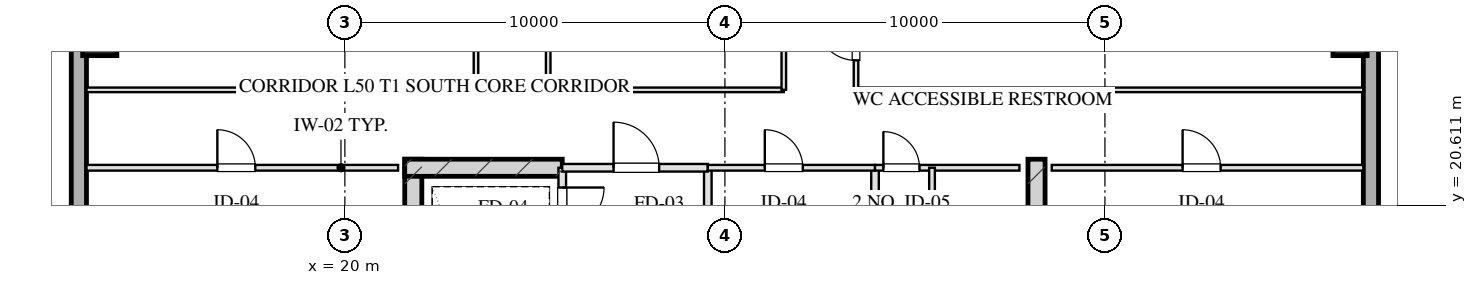
"""IFC4 building model, lengths in metres.
Left out: names, types, materials, properties, quantities, classifications, styles, units other than length and angle.
Written with IfcOpenShell. Run it as: python <this file> out.ifc"""

import sys

from ifc_helpers import new_model, si_unit, direction, frame, frame_2d, origin, origin_2d, place, context, subcontext, project, spatial, rectangle, hollow_rectangle, extrude, element, fill, save


model = new_model("IFC4")
c1 = context("Model", 3, precision=1e-05, world=origin(), true_north=direction((0.0, 1.0)))
c2 = subcontext(c1, "Body", "Model", "MODEL_VIEW")
j1 = project(units=[si_unit("LENGTHUNIT", "METRE"), si_unit("PLANEANGLEUNIT", "RADIAN")], contexts=[c1])
p1 = place(None, origin())
s1 = spatial("IfcSite", under=j1, at=p1, CompositionType="ELEMENT")
p2 = place(p1, origin())
s2 = spatial("IfcBuilding", under=s1, at=p2, CompositionType="ELEMENT")
p3 = place(p2, frame((0.0, 0.0, 188.6)))
s3 = spatial("IfcBuildingStorey", under=s2, at=p3, CompositionType="ELEMENT", Elevation=188.6)
for number, where, z_axis, x_axis in (
    (1, (21.8, 21.825, 0.0), (0.0, 0.0, 1.0), (0.0, -1.0, 0.0)),
    (2, (38.2, 21.825, 0.0), (0.0, 0.0, 1.0), (0.0, -1.0, 0.0)),
):
    element("IfcWall", number, at=place(p3, frame(where, z_axis=z_axis, x_axis=x_axis)), inside=s3, PredefinedType="SHEAR", context=c2, shape_type="SweptSolid", body=[
        extrude(rectangle(XDim=9.33, YDim=0.45, at=frame_2d((4.665, 0.0))), origin(), (0.0, 0.0, 1.0), 3.45),
    ])
p4 = place(p3, frame((21.575, 21.6, 0.0), z_axis=(0.0, 0.0, 1.0), x_axis=(1.0, 0.0, 0.0)))
e3 = element("IfcWall", 3, at=p4, inside=s3, PredefinedType="SHEAR", context=c2, shape_type="SweptSolid", body=[
    extrude(rectangle(XDim=4.145, YDim=0.45, at=frame_2d((2.073, 0.0))), origin(), (0.0, 0.0, 1.0), 3.45),
])
for number, where, z_axis, x_axis in (
    (4, (13.55, 25.0, 0.0), (0.0, 0.0, 1.0), (1.0, 0.0, 0.0)),
    (5, (46.45, 25.0, 0.0), (0.0, 0.0, 1.0), (1.0, 0.0, 0.0)),
):
    element("IfcColumn", number, at=place(p3, frame(where, z_axis=z_axis, x_axis=x_axis)), inside=s3, PredefinedType="COLUMN", context=c2, shape_type="SweptSolid", body=[
        extrude(hollow_rectangle(XDim=0.9, YDim=0.9, WallThickness=0.032, at=origin_2d()), origin(), (0.0, 0.0, 1.0), 3.451),
    ])
p5 = place(p3, frame((13.0, 10.8, 0.0), z_axis=(0.0, 0.0, 1.0), x_axis=(0.0, 1.0, 0.0)))
e6 = element("IfcWall", 6, at=p5, inside=s3, PredefinedType="SOLIDWALL", context=c2, shape_type="SweptSolid", body=[
    extrude(rectangle(XDim=46.4, YDim=0.4, at=frame_2d((23.2, 0.0))), origin(), (0.0, 0.0, 1.0), 2.61),
])
p6 = place(p5, frame((24.75, 0.0, 0.75)))
e7 = element("IfcOpeningElement", 7, at=p6, cuts=e6, PredefinedType="OPENING", context=c2, shape_type="SweptSolid", body=[
    extrude(rectangle(XDim=2.1, YDim=1.46, at=frame_2d((1.05, 0.73))), frame((0.0, 0.21, 0.0), z_axis=(0.0, -1.0, 0.0), x_axis=(1.0, 0.0, 0.0)), (0.0, 0.0, 1.0), 0.42),
])
p7 = place(p5, frame((28.55, 0.0, 0.75)))
e8 = element("IfcOpeningElement", 8, at=p7, cuts=e6, PredefinedType="OPENING", context=c2, shape_type="SweptSolid", body=[
    extrude(rectangle(XDim=2.1, YDim=1.46, at=frame_2d((1.05, 0.73))), frame((0.0, 0.21, 0.0), z_axis=(0.0, -1.0, 0.0), x_axis=(1.0, 0.0, 0.0)), (0.0, 0.0, 1.0), 0.42),
])
p8 = place(p5, frame((19.55, 0.0, 0.0)))
e9 = element("IfcOpeningElement", 9, at=p8, cuts=e6, PredefinedType="OPENING", context=c2, shape_type="SweptSolid", body=[
    extrude(rectangle(XDim=1.1, YDim=2.15, at=frame_2d((0.55, 1.075))), frame((0.0, 0.21, 0.0), z_axis=(0.0, -1.0, 0.0), x_axis=(1.0, 0.0, 0.0)), (0.0, 0.0, 1.0), 0.42),
])
p9 = place(p3, frame((47.0, 57.2, 0.0), z_axis=(0.0, 0.0, 1.0), x_axis=(0.0, -1.0, 0.0)))
e10 = element("IfcWall", 10, at=p9, inside=s3, PredefinedType="SOLIDWALL", context=c2, shape_type="SweptSolid", body=[
    extrude(rectangle(XDim=46.4, YDim=0.4, at=frame_2d((23.2, 0.0))), origin(), (0.0, 0.0, 1.0), 2.61),
])
p10 = place(p9, frame((19.55, 0.0, 0.75)))
e11 = element("IfcOpeningElement", 11, at=p10, cuts=e10, PredefinedType="OPENING", context=c2, shape_type="SweptSolid", body=[
    extrude(rectangle(XDim=2.1, YDim=1.46, at=frame_2d((1.05, 0.73))), frame((0.0, 0.21, 0.0), z_axis=(0.0, -1.0, 0.0), x_axis=(1.0, 0.0, 0.0)), (0.0, 0.0, 1.0), 0.42),
])
p11 = place(p9, frame((15.75, 0.0, 0.75)))
e12 = element("IfcOpeningElement", 12, at=p11, cuts=e10, PredefinedType="OPENING", context=c2, shape_type="SweptSolid", body=[
    extrude(rectangle(XDim=2.1, YDim=1.46, at=frame_2d((1.05, 0.73))), frame((0.0, 0.21, 0.0), z_axis=(0.0, -1.0, 0.0), x_axis=(1.0, 0.0, 0.0)), (0.0, 0.0, 1.0), 0.42),
])
p12 = place(p9, frame((27.05, 0.0, 0.0)))
e13 = element("IfcOpeningElement", 13, at=p12, cuts=e10, PredefinedType="OPENING", context=c2, shape_type="SweptSolid", body=[
    extrude(rectangle(XDim=1.1, YDim=2.15, at=frame_2d((0.55, 1.075))), frame((0.0, 0.21, 0.0), z_axis=(0.0, -1.0, 0.0), x_axis=(1.0, 0.0, 0.0)), (0.0, 0.0, 1.0), 0.42),
])
p13 = place(p3, frame((25.72, 21.6, 0.0), z_axis=(0.0, 0.0, 1.0), x_axis=(0.0, -1.0, 0.0)))
e14 = element("IfcWall", 14, at=p13, inside=s3, PredefinedType="PARTITIONING", context=c2, shape_type="SweptSolid", body=[
    extrude(rectangle(XDim=1.9, YDim=0.2, at=frame_2d((0.95, 0.0))), origin(), (0.0, 0.0, 1.0), 3.175),
])
p14 = place(p13, frame((0.52, 0.0, 0.0)))
e15 = element("IfcOpeningElement", 15, at=p14, cuts=e14, PredefinedType="OPENING", context=c2, shape_type="SweptSolid", body=[
    extrude(rectangle(XDim=1.1, YDim=2.05, at=frame_2d((0.55, 1.025))), frame((0.0, 0.11, 0.0), z_axis=(0.0, -1.0, 0.0), x_axis=(1.0, 0.0, 0.0)), (0.0, 0.0, 1.0), 0.22),
])
p15 = place(p3, frame((29.55, 21.6, 0.0), z_axis=(0.0, 0.0, 1.0), x_axis=(0.0, -1.0, 0.0)))
e16 = element("IfcWall", 16, at=p15, inside=s3, PredefinedType="PARTITIONING", context=c2, shape_type="SweptSolid", body=[
    extrude(rectangle(XDim=8.43, YDim=0.2, at=frame_2d((4.215, 0.0))), origin(), (0.0, 0.0, 1.0), 3.175),
])
p16 = place(p3, frame((25.72, 21.6, 0.0), z_axis=(0.0, 0.0, 1.0), x_axis=(1.0, 0.0, 0.0)))
e17 = element("IfcWall", 17, at=p16, inside=s3, PredefinedType="PARTITIONING", context=c2, shape_type="SweptSolid", body=[
    extrude(rectangle(XDim=3.83, YDim=0.2, at=frame_2d((1.915, 0.0))), origin(), (0.0, 0.0, 1.0), 3.175),
])
p17 = place(p16, frame((1.35, 0.0, 0.0)))
e18 = element("IfcOpeningElement", 18, at=p17, cuts=e17, PredefinedType="OPENING", context=c2, shape_type="SweptSolid", body=[
    extrude(rectangle(XDim=1.2, YDim=2.05, at=frame_2d((0.6, 1.025))), frame((0.0, 0.11, 0.0), z_axis=(0.0, -1.0, 0.0), x_axis=(1.0, 0.0, 0.0)), (0.0, 0.0, 1.0), 0.22),
])
p18 = place(p3, frame((33.95, 21.6, 0.0), z_axis=(0.0, 0.0, 1.0), x_axis=(0.0, -1.0, 0.0)))
e19 = element("IfcWall", 19, at=p18, inside=s3, PredefinedType="PARTITIONING", context=c2, shape_type="SweptSolid", body=[
    extrude(rectangle(XDim=8.43, YDim=0.2, at=frame_2d((4.215, 0.0))), origin(), (0.0, 0.0, 1.0), 3.175),
])
p19 = place(p3, frame((29.55, 21.6, 0.0), z_axis=(0.0, 0.0, 1.0), x_axis=(1.0, 0.0, 0.0)))
e20 = element("IfcWall", 20, at=p19, inside=s3, PredefinedType="PARTITIONING", context=c2, shape_type="SweptSolid", body=[
    extrude(rectangle(XDim=4.4, YDim=0.15, at=frame_2d((2.2, 0.0))), origin(), (0.0, 0.0, 1.0), 3.175),
])
p20 = place(p19, frame((1.5, 0.0, 0.0)))
e21 = element("IfcOpeningElement", 21, at=p20, cuts=e20, PredefinedType="OPENING", context=c2, shape_type="SweptSolid", body=[
    extrude(rectangle(XDim=1.0, YDim=2.05, at=frame_2d((0.5, 1.025))), frame((0.0, 0.085, 0.0), z_axis=(0.0, -1.0, 0.0), x_axis=(1.0, 0.0, 0.0)), (0.0, 0.0, 1.0), 0.17),
])
p21 = place(p3, frame((33.95, 21.6, 0.0), z_axis=(0.0, 0.0, 1.0), x_axis=(1.0, 0.0, 0.0)))
e22 = element("IfcWall", 22, at=p21, inside=s3, PredefinedType="PARTITIONING", context=c2, shape_type="SweptSolid", body=[
    extrude(rectangle(XDim=3.8, YDim=0.15, at=frame_2d((1.9, 0.0))), origin(), (0.0, 0.0, 1.0), 3.175),
])
p22 = place(p21, frame((0.22, 0.0, 0.0)))
e23 = element("IfcOpeningElement", 23, at=p22, cuts=e22, PredefinedType="OPENING", context=c2, shape_type="SweptSolid", body=[
    extrude(rectangle(XDim=0.95, YDim=2.05, at=frame_2d((0.475, 1.025))), frame((0.0, 0.085, 0.0), z_axis=(0.0, -1.0, 0.0), x_axis=(1.0, 0.0, 0.0)), (0.0, 0.0, 1.0), 0.17),
])
p23 = place(p3, frame((35.45, 21.6, 0.0), z_axis=(0.0, 0.0, 1.0), x_axis=(0.0, -1.0, 0.0)))
e24 = element("IfcWall", 24, at=p23, inside=s3, PredefinedType="PARTITIONING", context=c2, shape_type="SweptSolid", body=[
    extrude(rectangle(XDim=8.43, YDim=0.15, at=frame_2d((4.215, 0.0))), origin(), (0.0, 0.0, 1.0), 2.765),
])
p24 = place(p23, frame((2.55, 0.0, 0.0)))
e25 = element("IfcOpeningElement", 25, at=p24, cuts=e24, PredefinedType="OPENING", context=c2, shape_type="SweptSolid", body=[
    extrude(rectangle(XDim=0.95, YDim=2.05, at=frame_2d((0.475, 1.025))), frame((0.0, 0.085, 0.0), z_axis=(0.0, -1.0, 0.0), x_axis=(1.0, 0.0, 0.0)), (0.0, 0.0, 1.0), 0.17),
])
p25 = place(p23, frame((5.8, 0.0, 0.0)))
e26 = element("IfcOpeningElement", 26, at=p25, cuts=e24, PredefinedType="OPENING", context=c2, shape_type="SweptSolid", body=[
    extrude(rectangle(XDim=0.9, YDim=2.05, at=frame_2d((0.45, 1.025))), frame((0.0, 0.085, 0.0), z_axis=(0.0, -1.0, 0.0), x_axis=(1.0, 0.0, 0.0)), (0.0, 0.0, 1.0), 0.17),
])
p26 = place(p3, frame((13.2, 21.6, 0.0), z_axis=(0.0, 0.0, 1.0), x_axis=(1.0, 0.0, 0.0)))
e27 = element("IfcWall", 27, at=p26, inside=s3, PredefinedType="PARTITIONING", context=c2, shape_type="SweptSolid", body=[
    extrude(rectangle(XDim=8.2, YDim=0.15, at=frame_2d((4.1, 0.0))), origin(), (0.0, 0.0, 1.0), 3.175),
])
p27 = place(p26, frame((3.444, 0.0, 0.0)))
e28 = element("IfcOpeningElement", 28, at=p27, cuts=e27, PredefinedType="OPENING", context=c2, shape_type="SweptSolid", body=[
    extrude(rectangle(XDim=1.0, YDim=2.05, at=frame_2d((0.5, 1.025))), frame((0.0, 0.085, 0.0), z_axis=(0.0, -1.0, 0.0), x_axis=(1.0, 0.0, 0.0)), (0.0, 0.0, 1.0), 0.17),
])
p28 = place(p3, frame((38.6, 21.6, 0.0), z_axis=(0.0, 0.0, 1.0), x_axis=(1.0, 0.0, 0.0)))
e29 = element("IfcWall", 29, at=p28, inside=s3, PredefinedType="PARTITIONING", context=c2, shape_type="SweptSolid", body=[
    extrude(rectangle(XDim=8.2, YDim=0.15, at=frame_2d((4.1, 0.0))), origin(), (0.0, 0.0, 1.0), 3.175),
])
p29 = place(p28, frame((3.444, 0.0, 0.0)))
e30 = element("IfcOpeningElement", 30, at=p29, cuts=e29, PredefinedType="OPENING", context=c2, shape_type="SweptSolid", body=[
    extrude(rectangle(XDim=1.0, YDim=2.05, at=frame_2d((0.5, 1.025))), frame((0.0, 0.085, 0.0), z_axis=(0.0, -1.0, 0.0), x_axis=(1.0, 0.0, 0.0)), (0.0, 0.0, 1.0), 0.17),
])
p30 = place(p3, frame((13.2, 23.65, 0.0), z_axis=(0.0, 0.0, 1.0), x_axis=(1.0, 0.0, 0.0)))
e31 = element("IfcWall", 31, at=p30, inside=s3, PredefinedType="PARTITIONING", context=c2, shape_type="SweptSolid", body=[
    extrude(rectangle(XDim=10.25, YDim=0.12, at=frame_2d((5.125, 0.0))), origin(), (0.0, 0.0, 1.0), 3.175),
])
p31 = place(p3, frame((25.35, 23.65, 0.0), z_axis=(0.0, 0.0, 1.0), x_axis=(1.0, 0.0, 0.0)))
e32 = element("IfcWall", 32, at=p31, inside=s3, PredefinedType="PARTITIONING", context=c2, shape_type="SweptSolid", body=[
    extrude(rectangle(XDim=6.2, YDim=0.12, at=frame_2d((3.1, 0.0))), origin(), (0.0, 0.0, 1.0), 3.175),
])
p32 = place(p3, frame((33.45, 23.65, 0.0), z_axis=(0.0, 0.0, 1.0), x_axis=(1.0, 0.0, 0.0)))
e33 = element("IfcWall", 33, at=p32, inside=s3, PredefinedType="PARTITIONING", context=c2, shape_type="SweptSolid", body=[
    extrude(rectangle(XDim=13.35, YDim=0.12, at=frame_2d((6.675, 0.0))), origin(), (0.0, 0.0, 1.0), 3.175),
])
p33 = place(p3, frame((23.45, 23.65, 0.0), z_axis=(0.0, 0.0, 1.0), x_axis=(0.0, 1.0, 0.0)))
e34 = element("IfcWall", 34, at=p33, inside=s3, PredefinedType="PARTITIONING", context=c2, shape_type="SweptSolid", body=[
    extrude(rectangle(XDim=20.7, YDim=0.12, at=frame_2d((10.35, 0.0))), origin(), (0.0, 0.0, 1.0), 3.175),
])
p34 = place(p33, frame((2.175, 0.0, 0.0)))
e35 = element("IfcOpeningElement", 35, at=p34, cuts=e34, PredefinedType="OPENING", context=c2, shape_type="SweptSolid", body=[
    extrude(rectangle(XDim=1.0, YDim=2.05, at=frame_2d((0.5, 1.025))), frame((0.0, 0.07, 0.0), z_axis=(0.0, -1.0, 0.0), x_axis=(1.0, 0.0, 0.0)), (0.0, 0.0, 1.0), 0.14),
])
p35 = place(p33, frame((6.883, 0.0, 0.0)))
e36 = element("IfcOpeningElement", 36, at=p35, cuts=e34, PredefinedType="OPENING", context=c2, shape_type="SweptSolid", body=[
    extrude(rectangle(XDim=1.0, YDim=2.05, at=frame_2d((0.5, 1.025))), frame((0.0, 0.07, 0.0), z_axis=(0.0, -1.0, 0.0), x_axis=(1.0, 0.0, 0.0)), (0.0, 0.0, 1.0), 0.14),
])
p36 = place(p33, frame((11.502, 0.0, 0.0)))
e37 = element("IfcOpeningElement", 37, at=p36, cuts=e34, PredefinedType="OPENING", context=c2, shape_type="SweptSolid", body=[
    extrude(rectangle(XDim=1.0, YDim=2.05, at=frame_2d((0.5, 1.025))), frame((0.0, 0.07, 0.0), z_axis=(0.0, -1.0, 0.0), x_axis=(1.0, 0.0, 0.0)), (0.0, 0.0, 1.0), 0.14),
])
p37 = place(p33, frame((17.145, 0.0, 0.0)))
e38 = element("IfcOpeningElement", 38, at=p37, cuts=e34, PredefinedType="OPENING", context=c2, shape_type="SweptSolid", body=[
    extrude(rectangle(XDim=0.85, YDim=2.05, at=frame_2d((0.425, 1.025))), frame((0.0, 0.07, 0.0), z_axis=(0.0, -1.0, 0.0), x_axis=(1.0, 0.0, 0.0)), (0.0, 0.0, 1.0), 0.14),
])
p38 = place(p3, frame((25.35, 23.65, 0.0), z_axis=(0.0, 0.0, 1.0), x_axis=(0.0, 1.0, 0.0)))
e39 = element("IfcWall", 39, at=p38, inside=s3, PredefinedType="PARTITIONING", context=c2, shape_type="SweptSolid", body=[
    extrude(rectangle(XDim=20.7, YDim=0.12, at=frame_2d((10.35, 0.0))), origin(), (0.0, 0.0, 1.0), 3.175),
])
p39 = place(p38, frame((4.963, 0.0, 0.0)))
e40 = element("IfcOpeningElement", 40, at=p39, cuts=e39, PredefinedType="OPENING", context=c2, shape_type="SweptSolid", body=[
    extrude(rectangle(XDim=1.1, YDim=2.05, at=frame_2d((0.55, 1.025))), frame((0.0, 0.07, 0.0), z_axis=(0.0, -1.0, 0.0), x_axis=(1.0, 0.0, 0.0)), (0.0, 0.0, 1.0), 0.14),
])
p40 = place(p38, frame((15.382, 0.0, 0.0)))
e41 = element("IfcOpeningElement", 41, at=p40, cuts=e39, PredefinedType="OPENING", context=c2, shape_type="SweptSolid", body=[
    extrude(rectangle(XDim=1.1, YDim=2.05, at=frame_2d((0.55, 1.025))), frame((0.0, 0.07, 0.0), z_axis=(0.0, -1.0, 0.0), x_axis=(1.0, 0.0, 0.0)), (0.0, 0.0, 1.0), 0.14),
])
p41 = place(p3, frame((31.55, 23.65, 0.0), z_axis=(0.0, 0.0, 1.0), x_axis=(0.0, 1.0, 0.0)))
e42 = element("IfcWall", 42, at=p41, inside=s3, PredefinedType="PARTITIONING", context=c2, shape_type="SweptSolid", body=[
    extrude(rectangle(XDim=20.7, YDim=0.12, at=frame_2d((10.35, 0.0))), origin(), (0.0, 0.0, 1.0), 3.175),
])
p42 = place(p3, frame((33.45, 23.65, 0.0), z_axis=(0.0, 0.0, 1.0), x_axis=(0.0, 1.0, 0.0)))
e43 = element("IfcWall", 43, at=p42, inside=s3, PredefinedType="PARTITIONING", context=c2, shape_type="SweptSolid", body=[
    extrude(rectangle(XDim=20.7, YDim=0.12, at=frame_2d((10.35, 0.0))), origin(), (0.0, 0.0, 1.0), 3.175),
])
p43 = place(p42, frame((0.775, 0.0, 0.0)))
e44 = element("IfcOpeningElement", 44, at=p43, cuts=e43, PredefinedType="OPENING", context=c2, shape_type="SweptSolid", body=[
    extrude(rectangle(XDim=1.05, YDim=2.05, at=frame_2d((0.525, 1.025))), frame((0.0, 0.07, 0.0), z_axis=(0.0, -1.0, 0.0), x_axis=(1.0, 0.0, 0.0)), (0.0, 0.0, 1.0), 0.14),
])
p44 = place(p42, frame((5.35, 0.0, 0.0)))
e45 = element("IfcOpeningElement", 45, at=p44, cuts=e43, PredefinedType="OPENING", context=c2, shape_type="SweptSolid", body=[
    extrude(rectangle(XDim=1.0, YDim=2.05, at=frame_2d((0.5, 1.025))), frame((0.0, 0.07, 0.0), z_axis=(0.0, -1.0, 0.0), x_axis=(1.0, 0.0, 0.0)), (0.0, 0.0, 1.0), 0.14),
])
p45 = place(p42, frame((9.85, 0.0, 0.0)))
e46 = element("IfcOpeningElement", 46, at=p45, cuts=e43, PredefinedType="OPENING", context=c2, shape_type="SweptSolid", body=[
    extrude(rectangle(XDim=1.0, YDim=2.05, at=frame_2d((0.5, 1.025))), frame((0.0, 0.07, 0.0), z_axis=(0.0, -1.0, 0.0), x_axis=(1.0, 0.0, 0.0)), (0.0, 0.0, 1.0), 0.14),
])
p46 = place(p42, frame((12.95, 0.0, 0.0)))
e47 = element("IfcOpeningElement", 47, at=p46, cuts=e43, PredefinedType="OPENING", context=c2, shape_type="SweptSolid", body=[
    extrude(rectangle(XDim=1.0, YDim=2.05, at=frame_2d((0.5, 1.025))), frame((0.0, 0.07, 0.0), z_axis=(0.0, -1.0, 0.0), x_axis=(1.0, 0.0, 0.0)), (0.0, 0.0, 1.0), 0.14),
])
p47 = place(p42, frame((17.525, 0.0, 0.0)))
e48 = element("IfcOpeningElement", 48, at=p47, cuts=e43, PredefinedType="OPENING", context=c2, shape_type="SweptSolid", body=[
    extrude(rectangle(XDim=1.0, YDim=2.05, at=frame_2d((0.5, 1.025))), frame((0.0, 0.07, 0.0), z_axis=(0.0, -1.0, 0.0), x_axis=(1.0, 0.0, 0.0)), (0.0, 0.0, 1.0), 0.14),
])
p48 = place(p14, origin())
e49 = element("IfcDoor", 49, at=p48, inside=s3, OperationType="SINGLE_SWING_LEFT", PredefinedType="DOOR", context=c2, shape_type="SweptSolid", body=[
    extrude(rectangle(XDim=1.1, YDim=2.05, at=frame_2d((0.55, 1.025))), frame((0.0, 0.025, 0.0), z_axis=(0.0, -1.0, 0.0), x_axis=(1.0, 0.0, 0.0)), (0.0, 0.0, 1.0), 0.05),
])
fill(e15, e49)
p49 = place(p17, origin())
e50 = element("IfcDoor", 50, at=p49, inside=s3, OperationType="SINGLE_SWING_LEFT", PredefinedType="DOOR", context=c2, shape_type="SweptSolid", body=[
    extrude(rectangle(XDim=1.2, YDim=2.05, at=frame_2d((0.6, 1.025))), frame((0.0, 0.025, 0.0), z_axis=(0.0, -1.0, 0.0), x_axis=(1.0, 0.0, 0.0)), (0.0, 0.0, 1.0), 0.05),
])
fill(e18, e50)
p50 = place(p20, origin())
e51 = element("IfcDoor", 51, at=p50, inside=s3, OperationType="SINGLE_SWING_LEFT", PredefinedType="DOOR", context=c2, shape_type="SweptSolid", body=[
    extrude(rectangle(XDim=1.0, YDim=2.05, at=frame_2d((0.5, 1.025))), frame((0.0, 0.025, 0.0), z_axis=(0.0, -1.0, 0.0), x_axis=(1.0, 0.0, 0.0)), (0.0, 0.0, 1.0), 0.05),
])
fill(e21, e51)
p51 = place(p22, origin())
e52 = element("IfcDoor", 52, at=p51, inside=s3, OperationType="SINGLE_SWING_LEFT", PredefinedType="DOOR", context=c2, shape_type="SweptSolid", body=[
    extrude(rectangle(XDim=0.95, YDim=2.05, at=frame_2d((0.475, 1.025))), frame((0.0, 0.025, 0.0), z_axis=(0.0, -1.0, 0.0), x_axis=(1.0, 0.0, 0.0)), (0.0, 0.0, 1.0), 0.05),
])
fill(e23, e52)
p52 = place(p27, origin())
e53 = element("IfcDoor", 53, at=p52, inside=s3, OperationType="SINGLE_SWING_LEFT", PredefinedType="DOOR", context=c2, shape_type="SweptSolid", body=[
    extrude(rectangle(XDim=1.0, YDim=2.05, at=frame_2d((0.5, 1.025))), frame((0.0, 0.025, 0.0), z_axis=(0.0, -1.0, 0.0), x_axis=(1.0, 0.0, 0.0)), (0.0, 0.0, 1.0), 0.05),
])
fill(e28, e53)
p53 = place(p29, origin())
e54 = element("IfcDoor", 54, at=p53, inside=s3, OperationType="SINGLE_SWING_LEFT", PredefinedType="DOOR", context=c2, shape_type="SweptSolid", body=[
    extrude(rectangle(XDim=1.0, YDim=2.05, at=frame_2d((0.5, 1.025))), frame((0.0, 0.025, 0.0), z_axis=(0.0, -1.0, 0.0), x_axis=(1.0, 0.0, 0.0)), (0.0, 0.0, 1.0), 0.05),
])
fill(e30, e54)
p54 = place(p43, origin())
e55 = element("IfcDoor", 55, at=p54, inside=s3, OperationType="SINGLE_SWING_RIGHT", PredefinedType="DOOR", context=c2, shape_type="SweptSolid", body=[
    extrude(rectangle(XDim=1.05, YDim=2.05, at=frame_2d((0.525, 1.025))), frame((0.0, 0.025, 0.0), z_axis=(0.0, -1.0, 0.0), x_axis=(1.0, 0.0, 0.0)), (0.0, 0.0, 1.0), 0.05),
])
fill(e44, e55)
save(model, sys.argv[1])
